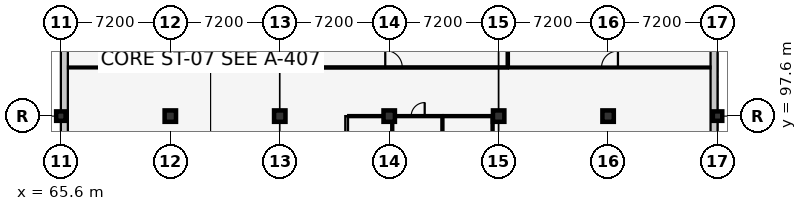
"""IFC4 building model, lengths in metres.
Left out: names, types, materials, properties, quantities, classifications, styles, units other than length and angle.
Written with IfcOpenShell. Run it as: python <this file> out.ifc"""

import sys

from ifc_helpers import new_model, si_unit, direction, frame, frame_2d, origin, origin_2d, place, context, subcontext, project, spatial, rectangle, circle, extrude, element, fill, save


model = new_model("IFC4")
c1 = context("Model", 3, precision=1e-05, world=origin(), true_north=direction((0.0, 1.0)))
c2 = subcontext(c1, "Body", "Model", "MODEL_VIEW")
j1 = project(units=[si_unit("LENGTHUNIT", "METRE"), si_unit("PLANEANGLEUNIT", "RADIAN")], contexts=[c1])
p1 = place(None, origin())
s1 = spatial("IfcSite", under=j1, at=p1, CompositionType="ELEMENT")
p2 = place(p1, origin())
s2 = spatial("IfcBuilding", under=s1, at=p2, CompositionType="ELEMENT")
p3 = place(p2, origin())
s3 = spatial("IfcBuildingStorey", under=s2, at=p3, CompositionType="ELEMENT", Elevation=0.0)
p4 = place(p3, frame((65.6, 97.6, 0.0), z_axis=(0.0, 0.0, 1.0), x_axis=(1.0, 0.0, 0.0)))
e1 = element("IfcColumn", 1, at=p4, inside=s3, PredefinedType="COLUMN", context=c2, shape_type="SweptSolid", body=[
    extrude(rectangle(XDim=0.62, YDim=0.62, at=origin_2d()), origin(), (0.0, 0.0, 1.0), 5.4),
])
for number, where, z_axis, x_axis in (
    (2, (72.8, 97.6, 0.0), (0.0, 0.0, 1.0), (1.0, 0.0, 0.0)),
    (3, (80.0, 97.6, 0.0), (0.0, 0.0, 1.0), (1.0, 0.0, 0.0)),
    (4, (87.2, 97.6, 0.0), (0.0, 0.0, 1.0), (1.0, 0.0, 0.0)),
    (5, (94.4, 97.6, 0.0), (0.0, 0.0, 1.0), (1.0, 0.0, 0.0)),
    (6, (101.6, 97.6, 0.0), (0.0, 0.0, 1.0), (1.0, 0.0, 0.0)),
):
    element("IfcColumn", number, at=place(p3, frame(where, z_axis=z_axis, x_axis=x_axis)), inside=s3, PredefinedType="COLUMN", context=c2, shape_type="SweptSolid", body=[
        extrude(circle(Radius=0.375, at=origin_2d()), origin(), (0.0, 0.0, 1.0), 5.4),
    ])
p5 = place(p3, frame((108.8, 97.6, 0.0), z_axis=(0.0, 0.0, 1.0), x_axis=(1.0, 0.0, 0.0)))
e7 = element("IfcColumn", 7, at=p5, inside=s3, PredefinedType="COLUMN", context=c2, shape_type="SweptSolid", body=[
    extrude(rectangle(XDim=0.62, YDim=0.62, at=origin_2d()), origin(), (0.0, 0.0, 1.0), 5.4),
])
p6 = place(p3, frame((108.57, 126.0, 0.0), z_axis=(0.0, 0.0, 1.0), x_axis=(0.0, -1.0, 0.0)))
e8 = element("IfcWall", 8, at=p6, inside=s3, PredefinedType="SOLIDWALL", context=c2, shape_type="SweptSolid", body=[
    extrude(rectangle(XDim=35.6, YDim=0.46, at=frame_2d((17.8, 0.0))), origin(), (0.0, 0.0, 1.0), 4.515),
])
p7 = place(p6, frame((1.378, 0.0, 0.9)))
e9 = element("IfcOpeningElement", 9, at=p7, cuts=e8, PredefinedType="OPENING", context=c2, shape_type="SweptSolid", body=[
    extrude(rectangle(XDim=1.2, YDim=1.35, at=frame_2d((0.6, 0.675))), frame((0.0, 0.242, 0.0), z_axis=(0.0, -1.0, 0.0), x_axis=(1.0, 0.0, 0.0)), (0.0, 0.0, 1.0), 0.484),
])
p8 = place(p6, frame((9.189, 0.0, 0.9)))
e10 = element("IfcOpeningElement", 10, at=p8, cuts=e8, PredefinedType="OPENING", context=c2, shape_type="SweptSolid", body=[
    extrude(rectangle(XDim=1.4, YDim=1.35, at=frame_2d((0.7, 0.675))), frame((0.0, 0.242, 0.0), z_axis=(0.0, -1.0, 0.0), x_axis=(1.0, 0.0, 0.0)), (0.0, 0.0, 1.0), 0.484),
])
p9 = place(p6, frame((17.275, 0.0, 0.9)))
e11 = element("IfcOpeningElement", 11, at=p9, cuts=e8, PredefinedType="OPENING", context=c2, shape_type="SweptSolid", body=[
    extrude(rectangle(XDim=1.05, YDim=1.45, at=frame_2d((0.525, 0.725))), frame((0.0, 0.242, 0.0), z_axis=(0.0, -1.0, 0.0), x_axis=(1.0, 0.0, 0.0)), (0.0, 0.0, 1.0), 0.484),
])
p10 = place(p6, frame((32.897, 0.0, 0.9)))
e12 = element("IfcOpeningElement", 12, at=p10, cuts=e8, PredefinedType="OPENING", context=c2, shape_type="SweptSolid", body=[
    extrude(rectangle(XDim=1.45, YDim=1.45, at=frame_2d((0.725, 0.725))), frame((0.0, 0.242, 0.0), z_axis=(0.0, -1.0, 0.0), x_axis=(1.0, 0.0, 0.0)), (0.0, 0.0, 1.0), 0.484),
])
p11 = place(p3, frame((65.83, 90.4, 0.0), z_axis=(0.0, 0.0, 1.0), x_axis=(0.0, 1.0, 0.0)))
e13 = element("IfcWall", 13, at=p11, inside=s3, PredefinedType="SOLIDWALL", context=c2, shape_type="SweptSolid", body=[
    extrude(rectangle(XDim=35.6, YDim=0.46, at=frame_2d((17.8, 0.0))), origin(), (0.0, 0.0, 1.0), 4.515),
])
p12 = place(p11, frame((2.7, 0.0, 0.0)))
e14 = element("IfcOpeningElement", 14, at=p12, cuts=e13, PredefinedType="OPENING", context=c2, shape_type="SweptSolid", body=[
    extrude(rectangle(XDim=1.8, YDim=2.3, at=frame_2d((0.9, 1.15))), frame((0.0, 0.242, 0.0), z_axis=(0.0, -1.0, 0.0), x_axis=(1.0, 0.0, 0.0)), (0.0, 0.0, 1.0), 0.484),
])
p13 = place(p11, frame((17.15, 0.0, 0.9)))
e15 = element("IfcOpeningElement", 15, at=p13, cuts=e13, PredefinedType="OPENING", context=c2, shape_type="SweptSolid", body=[
    extrude(rectangle(XDim=1.3, YDim=1.35, at=frame_2d((0.65, 0.675))), frame((0.0, 0.242, 0.0), z_axis=(0.0, -1.0, 0.0), x_axis=(1.0, 0.0, 0.0)), (0.0, 0.0, 1.0), 0.484),
])
p14 = place(p11, frame((25.236, 0.0, 0.9)))
e16 = element("IfcOpeningElement", 16, at=p14, cuts=e13, PredefinedType="OPENING", context=c2, shape_type="SweptSolid", body=[
    extrude(rectangle(XDim=0.95, YDim=1.45, at=frame_2d((0.475, 0.725))), frame((0.0, 0.242, 0.0), z_axis=(0.0, -1.0, 0.0), x_axis=(1.0, 0.0, 0.0)), (0.0, 0.0, 1.0), 0.484),
])
p15 = place(p11, frame((33.047, 0.0, 0.9)))
e17 = element("IfcOpeningElement", 17, at=p15, cuts=e13, PredefinedType="OPENING", context=c2, shape_type="SweptSolid", body=[
    extrude(rectangle(XDim=1.15, YDim=1.45, at=frame_2d((0.575, 0.725))), frame((0.0, 0.242, 0.0), z_axis=(0.0, -1.0, 0.0), x_axis=(1.0, 0.0, 0.0)), (0.0, 0.0, 1.0), 0.484),
])
p16 = place(p3, frame((84.4, 94.0, 0.0), z_axis=(0.0, 0.0, 1.0), x_axis=(0.0, 1.0, 0.0)))
e18 = element("IfcWall", 18, at=p16, inside=s3, PredefinedType="PARTITIONING", context=c2, shape_type="SweptSolid", body=[
    extrude(rectangle(XDim=3.6, YDim=0.18, at=frame_2d((1.8, 0.0))), origin(), (0.0, 0.0, 1.0), 5.12),
])
p17 = place(p16, frame((1.27, 0.0, 0.0)))
e19 = element("IfcOpeningElement", 19, at=p17, cuts=e18, PredefinedType="OPENING", context=c2, shape_type="SweptSolid", body=[
    extrude(rectangle(XDim=1.06, YDim=2.1, at=frame_2d((0.53, 1.05))), frame((0.0, 0.102, 0.0), z_axis=(0.0, -1.0, 0.0), x_axis=(1.0, 0.0, 0.0)), (0.0, 0.0, 1.0), 0.204),
])
p18 = place(p3, frame((84.5, 97.6, 0.0), z_axis=(0.0, 0.0, 1.0), x_axis=(1.0, 0.0, 0.0)))
e20 = element("IfcWall", 20, at=p18, inside=s3, PredefinedType="PARTITIONING", context=c2, shape_type="SweptSolid", body=[
    extrude(rectangle(XDim=2.9, YDim=0.14, at=frame_2d((1.45, 0.0))), origin(), (0.0, 0.0, 1.0), 4.395),
])
p19 = place(p3, frame((87.4, 90.87, 0.0), z_axis=(0.0, 0.0, 1.0), x_axis=(0.0, 1.0, 0.0)))
e21 = element("IfcWall", 21, at=p19, inside=s3, PredefinedType="PARTITIONING", context=c2, shape_type="SweptSolid", body=[
    extrude(rectangle(XDim=6.65, YDim=0.14, at=frame_2d((3.325, 0.0))), origin(), (0.0, 0.0, 1.0), 4.495),
])
p20 = place(p3, frame((87.48, 97.6, 0.0), z_axis=(0.0, 0.0, 1.0), x_axis=(1.0, 0.0, 0.0)))
e22 = element("IfcWall", 22, at=p20, inside=s3, PredefinedType="PARTITIONING", context=c2, shape_type="SweptSolid", body=[
    extrude(rectangle(XDim=3.22, YDim=0.14, at=frame_2d((1.61, 0.0))), origin(), (0.0, 0.0, 1.0), 4.345),
])
p21 = place(p20, frame((1.165, 0.0, 0.0)))
e23 = element("IfcOpeningElement", 23, at=p21, cuts=e22, PredefinedType="OPENING", context=c2, shape_type="SweptSolid", body=[
    extrude(rectangle(XDim=0.89, YDim=2.05, at=frame_2d((0.445, 1.025))), frame((0.0, 0.082, 0.0), z_axis=(0.0, -1.0, 0.0), x_axis=(1.0, 0.0, 0.0)), (0.0, 0.0, 1.0), 0.164),
])
p22 = place(p3, frame((90.7, 90.87, 0.0), z_axis=(0.0, 0.0, 1.0), x_axis=(0.0, 1.0, 0.0)))
e24 = element("IfcWall", 24, at=p22, inside=s3, PredefinedType="PARTITIONING", context=c2, shape_type="SweptSolid", body=[
    extrude(rectangle(XDim=6.65, YDim=0.14, at=frame_2d((3.325, 0.0))), origin(), (0.0, 0.0, 1.0), 4.785),
])
p23 = place(p3, frame((90.78, 97.6, 0.0), z_axis=(0.0, 0.0, 1.0), x_axis=(1.0, 0.0, 0.0)))
e25 = element("IfcWall", 25, at=p23, inside=s3, PredefinedType="PARTITIONING", context=c2, shape_type="SweptSolid", body=[
    extrude(rectangle(XDim=3.22, YDim=0.14, at=frame_2d((1.61, 0.0))), origin(), (0.0, 0.0, 1.0), 4.345),
])
p24 = place(p3, frame((94.0, 90.87, 0.0), z_axis=(0.0, 0.0, 1.0), x_axis=(0.0, 1.0, 0.0)))
e26 = element("IfcWall", 26, at=p24, inside=s3, PredefinedType="PARTITIONING", context=c2, shape_type="SweptSolid", body=[
    extrude(rectangle(XDim=6.65, YDim=0.14, at=frame_2d((3.325, 0.0))), origin(), (0.0, 0.0, 1.0), 5.12),
])
p25 = place(p24, frame((2.87, 0.0, 0.0)))
e27 = element("IfcOpeningElement", 27, at=p25, cuts=e26, PredefinedType="OPENING", context=c2, shape_type="SweptSolid", body=[
    extrude(rectangle(XDim=0.91, YDim=2.06, at=frame_2d((0.455, 1.03))), frame((0.0, 0.082, 0.0), z_axis=(0.0, -1.0, 0.0), x_axis=(1.0, 0.0, 0.0)), (0.0, 0.0, 1.0), 0.164),
])
p26 = place(p3, frame((77.0, 100.8, 0.0), z_axis=(0.0, 0.0, 1.0), x_axis=(0.0, 1.0, 0.0)))
e28 = element("IfcWall", 28, at=p26, inside=s3, PredefinedType="PARTITIONING", context=c2, shape_type="SweptSolid", body=[
    extrude(rectangle(XDim=24.73, YDim=0.18, at=frame_2d((12.365, 0.0))), origin(), (0.0, 0.0, 1.0), 5.12),
])
p27 = place(p26, frame((11.775, 0.0, 0.0)))
e29 = element("IfcOpeningElement", 29, at=p27, cuts=e28, PredefinedType="OPENING", context=c2, shape_type="SweptSolid", body=[
    extrude(rectangle(XDim=1.18, YDim=2.2, at=frame_2d((0.59, 1.1))), frame((0.0, 0.102, 0.0), z_axis=(0.0, -1.0, 0.0), x_axis=(1.0, 0.0, 0.0)), (0.0, 0.0, 1.0), 0.204),
])
p28 = place(p3, frame((66.07, 100.8, 0.0), z_axis=(0.0, 0.0, 1.0), x_axis=(1.0, 0.0, 0.0)))
e30 = element("IfcWall", 30, at=p28, inside=s3, PredefinedType="PARTITIONING", context=c2, shape_type="SweptSolid", body=[
    extrude(rectangle(XDim=10.83, YDim=0.125, at=frame_2d((5.415, 0.0))), origin(), (0.0, 0.0, 1.0), 5.12),
])
p29 = place(p3, frame((80.0, 100.8, 0.0), z_axis=(0.0, 0.0, 1.0), x_axis=(1.0, 0.0, 0.0)))
e31 = element("IfcWall", 31, at=p29, inside=s3, PredefinedType="PARTITIONING", context=c2, shape_type="SweptSolid", body=[
    extrude(rectangle(XDim=15.0, YDim=0.15, at=frame_2d((7.5, 0.0))), origin(), (0.0, 0.0, 1.0), 5.12),
])
p30 = place(p29, frame((6.94, 0.0, 0.0)))
e32 = element("IfcOpeningElement", 32, at=p30, cuts=e31, PredefinedType="OPENING", context=c2, shape_type="SweptSolid", body=[
    extrude(rectangle(XDim=1.12, YDim=2.15, at=frame_2d((0.56, 1.075))), frame((0.0, 0.087, 0.0), z_axis=(0.0, -1.0, 0.0), x_axis=(1.0, 0.0, 0.0)), (0.0, 0.0, 1.0), 0.174),
])
p31 = place(p3, frame((80.0, 100.885, 0.0), z_axis=(0.0, 0.0, 1.0), x_axis=(0.0, 1.0, 0.0)))
e33 = element("IfcWall", 33, at=p31, inside=s3, PredefinedType="PARTITIONING", context=c2, shape_type="SweptSolid", body=[
    extrude(rectangle(XDim=13.03, YDim=0.15, at=frame_2d((6.515, 0.0))), origin(), (0.0, 0.0, 1.0), 4.495),
])
p32 = place(p3, frame((95.0, 100.885, 0.0), z_axis=(0.0, 0.0, 1.0), x_axis=(0.0, 1.0, 0.0)))
e34 = element("IfcWall", 34, at=p32, inside=s3, PredefinedType="PARTITIONING", context=c2, shape_type="SweptSolid", body=[
    extrude(rectangle(XDim=13.03, YDim=0.15, at=frame_2d((6.515, 0.0))), origin(), (0.0, 0.0, 1.0), 5.12),
])
p33 = place(p3, frame((95.085, 100.8, 0.0), z_axis=(0.0, 0.0, 1.0), x_axis=(1.0, 0.0, 0.0)))
e35 = element("IfcWall", 35, at=p33, inside=s3, PredefinedType="PARTITIONING", context=c2, shape_type="SweptSolid", body=[
    extrude(rectangle(XDim=13.245, YDim=0.125, at=frame_2d((6.623, 0.0))), origin(), (0.0, 0.0, 1.0), 5.12),
])
p34 = place(p33, frame((6.083, 0.0, 0.0)))
e36 = element("IfcOpeningElement", 36, at=p34, cuts=e35, PredefinedType="OPENING", context=c2, shape_type="SweptSolid", body=[
    extrude(rectangle(XDim=1.08, YDim=2.15, at=frame_2d((0.54, 1.075))), frame((0.0, 0.074, 0.0), z_axis=(0.0, -1.0, 0.0), x_axis=(1.0, 0.0, 0.0)), (0.0, 0.0, 1.0), 0.149),
])
p35 = place(p21, origin())
e37 = element("IfcDoor", 37, at=p35, inside=s3, OperationType="SINGLE_SWING_RIGHT", PredefinedType="DOOR", context=c2, shape_type="SweptSolid", body=[
    extrude(rectangle(XDim=0.89, YDim=2.05, at=frame_2d((0.445, 1.025))), frame((0.0, 0.025, 0.0), z_axis=(0.0, -1.0, 0.0), x_axis=(1.0, 0.0, 0.0)), (0.0, 0.0, 1.0), 0.05),
])
fill(e23, e37)
p36 = place(p30, origin())
e38 = element("IfcDoor", 38, at=p36, inside=s3, OperationType="SINGLE_SWING_LEFT", PredefinedType="DOOR", context=c2, shape_type="SweptSolid", body=[
    extrude(rectangle(XDim=1.12, YDim=2.15, at=frame_2d((0.56, 1.075))), frame((0.0, 0.025, 0.0), z_axis=(0.0, -1.0, 0.0), x_axis=(1.0, 0.0, 0.0)), (0.0, 0.0, 1.0), 0.05),
])
fill(e32, e38)
p37 = place(p34, origin())
e39 = element("IfcDoor", 39, at=p37, inside=s3, OperationType="SINGLE_SWING_RIGHT", PredefinedType="DOOR", context=c2, shape_type="SweptSolid", body=[
    extrude(rectangle(XDim=1.08, YDim=2.15, at=frame_2d((0.54, 1.075))), frame((0.0, 0.025, 0.0), z_axis=(0.0, -1.0, 0.0), x_axis=(1.0, 0.0, 0.0)), (0.0, 0.0, 1.0), 0.05),
])
fill(e36, e39)
save(model, sys.argv[1])
